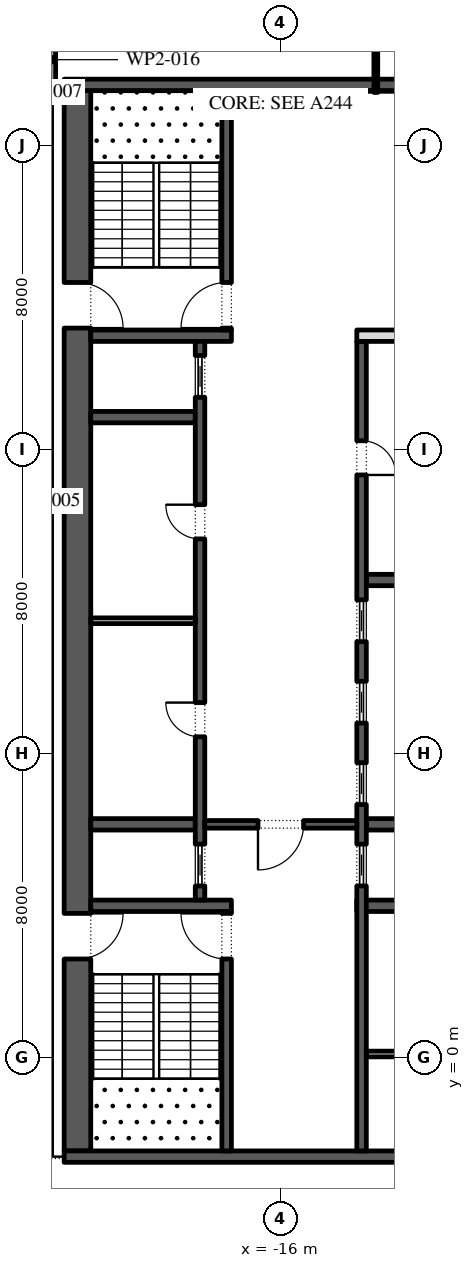
"""IFC4 building model, lengths in metres.
Left out: names, types, materials, properties, quantities, classifications, styles, units other than length and angle.
Written with IfcOpenShell. Run it as: python <this file> out.ifc"""

import sys

from ifc_helpers import new_model, si_unit, direction, frame, frame_2d, origin, place, context, subcontext, project, spatial, rectangle, extrude, element, fill, save


model = new_model("IFC4")
c1 = context("Model", 3, precision=1e-05, world=origin(), true_north=direction((0.0, 1.0)))
c2 = subcontext(c1, "Body", "Model", "MODEL_VIEW")
j1 = project(units=[si_unit("LENGTHUNIT", "METRE"), si_unit("PLANEANGLEUNIT", "RADIAN")], contexts=[c1])
p1 = place(None, origin())
s1 = spatial("IfcSite", under=j1, at=p1, CompositionType="ELEMENT")
p2 = place(p1, origin())
s2 = spatial("IfcBuilding", under=s1, at=p2, CompositionType="ELEMENT")
p3 = place(p2, frame((0.0, 0.0, 188.4)))
s3 = spatial("IfcBuildingStorey", under=s2, at=p3, CompositionType="ELEMENT", Elevation=188.4)
p4 = place(p3, frame((-33.157, 30.092, 0.0), z_axis=(0.0, 0.0, 1.0), x_axis=(0.224950279389, -0.974370243697, 0.0)))
e1 = element("IfcWall", 1, at=p4, inside=s3, PredefinedType="STANDARD", context=c2, shape_type="SweptSolid", body=[
    extrude(rectangle(XDim=49.5, YDim=0.3, at=frame_2d((24.75, 0.0))), origin(), (0.0, 0.0, 1.0), 4.0),
])
p5 = place(p4, frame((2.207, 0.0, 0.0)))
e2 = element("IfcOpeningElement", 2, at=p5, cuts=e1, PredefinedType="OPENING", context=c2, shape_type="SweptSolid", body=[
    extrude(rectangle(XDim=2.4, YDim=3.5, at=frame_2d((1.2, 1.75))), frame((0.0, 0.16, 0.0), z_axis=(0.0, -1.0, 0.0), x_axis=(1.0, 0.0, 0.0)), (0.0, 0.0, 1.0), 0.32),
])
p6 = place(p4, frame((8.121, 0.0, 0.45)))
e3 = element("IfcOpeningElement", 3, at=p6, cuts=e1, PredefinedType="OPENING", context=c2, shape_type="SweptSolid", body=[
    extrude(rectangle(XDim=4.5, YDim=2.825, at=frame_2d((2.25, 1.413))), frame((0.0, 0.16, 0.0), z_axis=(0.0, -1.0, 0.0), x_axis=(1.0, 0.0, 0.0)), (0.0, 0.0, 1.0), 0.32),
])
p7 = place(p4, frame((15.236, 0.0, 0.45)))
e4 = element("IfcOpeningElement", 4, at=p7, cuts=e1, PredefinedType="OPENING", context=c2, shape_type="SweptSolid", body=[
    extrude(rectangle(XDim=4.5, YDim=2.95, at=frame_2d((2.25, 1.475))), frame((0.0, 0.16, 0.0), z_axis=(0.0, -1.0, 0.0), x_axis=(1.0, 0.0, 0.0)), (0.0, 0.0, 1.0), 0.32),
])
p8 = place(p4, frame((22.35, 0.0, 0.45)))
e5 = element("IfcOpeningElement", 5, at=p8, cuts=e1, PredefinedType="OPENING", context=c2, shape_type="SweptSolid", body=[
    extrude(rectangle(XDim=4.5, YDim=3.0, at=frame_2d((2.25, 1.5))), frame((0.0, 0.16, 0.0), z_axis=(0.0, -1.0, 0.0), x_axis=(1.0, 0.0, 0.0)), (0.0, 0.0, 1.0), 0.32),
])
p9 = place(p4, frame((30.514, 0.0, 0.0)))
e6 = element("IfcOpeningElement", 6, at=p9, cuts=e1, PredefinedType="OPENING", context=c2, shape_type="SweptSolid", body=[
    extrude(rectangle(XDim=2.4, YDim=3.5, at=frame_2d((1.2, 1.75))), frame((0.0, 0.16, 0.0), z_axis=(0.0, -1.0, 0.0), x_axis=(1.0, 0.0, 0.0)), (0.0, 0.0, 1.0), 0.32),
])
p10 = place(p4, frame((36.579, 0.0, 0.45)))
e7 = element("IfcOpeningElement", 7, at=p10, cuts=e1, PredefinedType="OPENING", context=c2, shape_type="SweptSolid", body=[
    extrude(rectangle(XDim=4.5, YDim=3.05, at=frame_2d((2.25, 1.525))), frame((0.0, 0.16, 0.0), z_axis=(0.0, -1.0, 0.0), x_axis=(1.0, 0.0, 0.0)), (0.0, 0.0, 1.0), 0.32),
])
p11 = place(p4, frame((43.693, 0.0, 0.45)))
e8 = element("IfcOpeningElement", 8, at=p11, cuts=e1, PredefinedType="OPENING", context=c2, shape_type="SweptSolid", body=[
    extrude(rectangle(XDim=4.5, YDim=3.05, at=frame_2d((2.25, 1.525))), frame((0.0, 0.16, 0.0), z_axis=(0.0, -1.0, 0.0), x_axis=(1.0, 0.0, 0.0)), (0.0, 0.0, 1.0), 0.32),
])
p12 = place(p3, frame((-21.35, -2.45, 0.0), z_axis=(0.0, 0.0, 1.0), x_axis=(0.0, 1.0, 0.0)))
e9 = element("IfcWall", 9, at=p12, inside=s3, PredefinedType="SHEAR", context=c2, shape_type="SweptSolid", body=[
    extrude(rectangle(XDim=27.9, YDim=0.7, at=frame_2d((13.95, 0.0))), origin(), (0.0, 0.0, 1.0), 4.0),
])
p13 = place(p12, frame((5.05, 0.0, 0.0)))
e10 = element("IfcOpeningElement", 10, at=p13, cuts=e9, PredefinedType="OPENING", context=c2, shape_type="SweptSolid", body=[
    extrude(rectangle(XDim=1.2, YDim=2.1, at=frame_2d((0.6, 1.05))), frame((0.0, 0.36, 0.0), z_axis=(0.0, -1.0, 0.0), x_axis=(1.0, 0.0, 0.0)), (0.0, 0.0, 1.0), 0.72),
])
p14 = place(p12, frame((21.65, 0.0, 0.0)))
e11 = element("IfcOpeningElement", 11, at=p14, cuts=e9, PredefinedType="OPENING", context=c2, shape_type="SweptSolid", body=[
    extrude(rectangle(XDim=1.2, YDim=2.1, at=frame_2d((0.6, 1.05))), frame((0.0, 0.36, 0.0), z_axis=(0.0, -1.0, 0.0), x_axis=(1.0, 0.0, 0.0)), (0.0, 0.0, 1.0), 0.72),
])
for number, where, z_axis, x_axis in (
    (12, (-21.7, -2.6, 0.0), (0.0, 0.0, 1.0), (1.0, 0.0, 0.0)),
    (13, (-21.7, 25.6, 0.0), (0.0, 0.0, 1.0), (1.0, 0.0, 0.0)),
):
    element("IfcWall", number, at=place(p3, frame(where, z_axis=z_axis, x_axis=x_axis)), inside=s3, PredefinedType="SHEAR", context=c2, shape_type="SweptSolid", body=[
        extrude(rectangle(XDim=11.4, YDim=0.3, at=frame_2d((5.7, 0.0))), origin(), (0.0, 0.0, 1.0), 4.0),
    ])
p15 = place(p3, frame((-21.0, 4.0, 0.0), z_axis=(0.0, 0.0, 1.0), x_axis=(1.0, 0.0, 0.0)))
e14 = element("IfcWall", 14, at=p15, inside=s3, PredefinedType="SHEAR", context=c2, shape_type="SweptSolid", body=[
    extrude(rectangle(XDim=3.7, YDim=0.3, at=frame_2d((1.85, 0.0))), origin(), (0.0, 0.0, 1.0), 4.0),
])
p16 = place(p3, frame((-17.425, -2.45, 0.0), z_axis=(0.0, 0.0, 1.0), x_axis=(0.0, 1.0, 0.0)))
e15 = element("IfcWall", 15, at=p16, inside=s3, PredefinedType="SHEAR", context=c2, shape_type="SweptSolid", body=[
    extrude(rectangle(XDim=6.3, YDim=0.25, at=frame_2d((3.15, 0.0))), origin(), (0.0, 0.0, 1.0), 4.0),
])
p17 = place(p16, frame((5.05, 0.0, 0.0)))
e16 = element("IfcOpeningElement", 16, at=p17, cuts=e15, PredefinedType="OPENING", context=c2, shape_type="SweptSolid", body=[
    extrude(rectangle(XDim=1.2, YDim=2.1, at=frame_2d((0.6, 1.05))), frame((0.0, 0.135, 0.0), z_axis=(0.0, -1.0, 0.0), x_axis=(1.0, 0.0, 0.0)), (0.0, 0.0, 1.0), 0.27),
])
p18 = place(p3, frame((-21.0, 19.0, 0.0), z_axis=(0.0, 0.0, 1.0), x_axis=(1.0, 0.0, 0.0)))
e17 = element("IfcWall", 17, at=p18, inside=s3, PredefinedType="SHEAR", context=c2, shape_type="SweptSolid", body=[
    extrude(rectangle(XDim=3.7, YDim=0.3, at=frame_2d((1.85, 0.0))), origin(), (0.0, 0.0, 1.0), 4.0),
])
p19 = place(p3, frame((-17.425, 19.15, 0.0), z_axis=(0.0, 0.0, 1.0), x_axis=(0.0, 1.0, 0.0)))
e18 = element("IfcWall", 18, at=p19, inside=s3, PredefinedType="SHEAR", context=c2, shape_type="SweptSolid", body=[
    extrude(rectangle(XDim=6.3, YDim=0.25, at=frame_2d((3.15, 0.0))), origin(), (0.0, 0.0, 1.0), 4.0),
])
p20 = place(p19, frame((0.05, 0.0, 0.0)))
e19 = element("IfcOpeningElement", 19, at=p20, cuts=e18, PredefinedType="OPENING", context=c2, shape_type="SweptSolid", body=[
    extrude(rectangle(XDim=1.2, YDim=2.1, at=frame_2d((0.6, 1.05))), frame((0.0, 0.135, 0.0), z_axis=(0.0, -1.0, 0.0), x_axis=(1.0, 0.0, 0.0)), (0.0, 0.0, 1.0), 0.27),
])
for number, where, z_axis, x_axis in (
    (20, (-21.0, 6.143, 0.0), (0.0, 0.0, 1.0), (1.0, 0.0, 0.0)),
    (21, (-21.0, 16.857, 0.0), (0.0, 0.0, 1.0), (1.0, 0.0, 0.0)),
):
    element("IfcWall", number, at=place(p3, frame(where, z_axis=z_axis, x_axis=x_axis)), inside=s3, PredefinedType="SHEAR", context=c2, shape_type="SweptSolid", body=[
        extrude(rectangle(XDim=2.75, YDim=0.3, at=frame_2d((1.375, 0.0))), origin(), (0.0, 0.0, 1.0), 4.0),
    ])
p21 = place(p3, frame((-18.125, 4.15, 0.0), z_axis=(0.0, 0.0, 1.0), x_axis=(0.0, 1.0, 0.0)))
e22 = element("IfcWall", 22, at=p21, inside=s3, PredefinedType="SHEAR", context=c2, shape_type="SweptSolid", body=[
    extrude(rectangle(XDim=14.7, YDim=0.25, at=frame_2d((7.35, 0.0))), origin(), (0.0, 0.0, 1.0), 4.0),
])
p22 = place(p21, frame((4.296, 0.0, 0.0)))
e23 = element("IfcOpeningElement", 23, at=p22, cuts=e22, PredefinedType="OPENING", context=c2, shape_type="SweptSolid", body=[
    extrude(rectangle(XDim=0.9, YDim=2.1, at=frame_2d((0.45, 1.05))), frame((0.0, 0.135, 0.0), z_axis=(0.0, -1.0, 0.0), x_axis=(1.0, 0.0, 0.0)), (0.0, 0.0, 1.0), 0.27),
])
p23 = place(p21, frame((9.504, 0.0, 0.0)))
e24 = element("IfcOpeningElement", 24, at=p23, cuts=e22, PredefinedType="OPENING", context=c2, shape_type="SweptSolid", body=[
    extrude(rectangle(XDim=0.9, YDim=2.1, at=frame_2d((0.45, 1.05))), frame((0.0, 0.135, 0.0), z_axis=(0.0, -1.0, 0.0), x_axis=(1.0, 0.0, 0.0)), (0.0, 0.0, 1.0), 0.27),
])
p24 = place(p21, frame((0.371, 0.0, 0.0)))
e25 = element("IfcOpeningElement", 25, at=p24, cuts=e22, PredefinedType="OPENING", context=c2, shape_type="SweptSolid", body=[
    extrude(rectangle(XDim=1.1, YDim=2.1, at=frame_2d((0.55, 1.05))), frame((0.0, 0.135, 0.0), z_axis=(0.0, -1.0, 0.0), x_axis=(1.0, 0.0, 0.0)), (0.0, 0.0, 1.0), 0.27),
])
p25 = place(p21, frame((13.229, 0.0, 0.0)))
e26 = element("IfcOpeningElement", 26, at=p25, cuts=e22, PredefinedType="OPENING", context=c2, shape_type="SweptSolid", body=[
    extrude(rectangle(XDim=1.1, YDim=2.1, at=frame_2d((0.55, 1.05))), frame((0.0, 0.135, 0.0), z_axis=(0.0, -1.0, 0.0), x_axis=(1.0, 0.0, 0.0)), (0.0, 0.0, 1.0), 0.27),
])
p26 = place(p3, frame((-21.0, 11.5, 0.0), z_axis=(0.0, 0.0, 1.0), x_axis=(1.0, 0.0, 0.0)))
e27 = element("IfcWall", 27, at=p26, inside=s3, PredefinedType="PARTITIONING", context=c2, shape_type="SweptSolid", body=[
    extrude(rectangle(XDim=2.75, YDim=0.15, at=frame_2d((1.375, 0.0))), origin(), (0.0, 0.0, 1.0), 4.0),
])
p27 = place(p3, frame((-14.0, 4.0, 0.0), z_axis=(0.0, 0.0, 1.0), x_axis=(1.0, 0.0, 0.0)))
e28 = element("IfcWall", 28, at=p27, inside=s3, PredefinedType="SHEAR", context=c2, shape_type="SweptSolid", body=[
    extrude(rectangle(XDim=3.0, YDim=0.3, at=frame_2d((1.5, 0.0))), origin(), (0.0, 0.0, 1.0), 4.0),
])
for number, where, z_axis, x_axis in (
    (29, (-13.75, 6.143, 0.0), (0.0, 0.0, 1.0), (1.0, 0.0, 0.0)),
    (30, (-13.75, 12.571, 0.0), (0.0, 0.0, 1.0), (1.0, 0.0, 0.0)),
):
    element("IfcWall", number, at=place(p3, frame(where, z_axis=z_axis, x_axis=x_axis)), inside=s3, PredefinedType="SHEAR", context=c2, shape_type="SweptSolid", body=[
        extrude(rectangle(XDim=2.75, YDim=0.3, at=frame_2d((1.375, 0.0))), origin(), (0.0, 0.0, 1.0), 4.0),
    ])
p28 = place(p3, frame((-13.875, -2.45, 0.0), z_axis=(0.0, 0.0, 1.0), x_axis=(0.0, 1.0, 0.0)))
e31 = element("IfcWall", 31, at=p28, inside=s3, PredefinedType="SHEAR", context=c2, shape_type="SweptSolid", body=[
    extrude(rectangle(XDim=21.3, YDim=0.25, at=frame_2d((10.65, 0.0))), origin(), (0.0, 0.0, 1.0), 4.0),
])
p29 = place(p28, frame((17.786, 0.0, 0.0)))
e32 = element("IfcOpeningElement", 32, at=p29, cuts=e31, PredefinedType="OPENING", context=c2, shape_type="SweptSolid", body=[
    extrude(rectangle(XDim=0.9, YDim=2.1, at=frame_2d((0.45, 1.05))), frame((0.0, 0.135, 0.0), z_axis=(0.0, -1.0, 0.0), x_axis=(1.0, 0.0, 0.0)), (0.0, 0.0, 1.0), 0.27),
])
p30 = place(p28, frame((6.971, 0.0, 0.0)))
e33 = element("IfcOpeningElement", 33, at=p30, cuts=e31, PredefinedType="OPENING", context=c2, shape_type="SweptSolid", body=[
    extrude(rectangle(XDim=1.1, YDim=2.1, at=frame_2d((0.55, 1.05))), frame((0.0, 0.135, 0.0), z_axis=(0.0, -1.0, 0.0), x_axis=(1.0, 0.0, 0.0)), (0.0, 0.0, 1.0), 0.27),
])
p31 = place(p28, frame((9.114, 0.0, 0.0)))
e34 = element("IfcOpeningElement", 34, at=p31, cuts=e31, PredefinedType="OPENING", context=c2, shape_type="SweptSolid", body=[
    extrude(rectangle(XDim=1.1, YDim=2.1, at=frame_2d((0.55, 1.05))), frame((0.0, 0.135, 0.0), z_axis=(0.0, -1.0, 0.0), x_axis=(1.0, 0.0, 0.0)), (0.0, 0.0, 1.0), 0.27),
])
p32 = place(p28, frame((11.257, 0.0, 0.0)))
e35 = element("IfcOpeningElement", 35, at=p32, cuts=e31, PredefinedType="OPENING", context=c2, shape_type="SweptSolid", body=[
    extrude(rectangle(XDim=1.1, YDim=2.1, at=frame_2d((0.55, 1.05))), frame((0.0, 0.135, 0.0), z_axis=(0.0, -1.0, 0.0), x_axis=(1.0, 0.0, 0.0)), (0.0, 0.0, 1.0), 0.27),
])
p33 = place(p28, frame((13.4, 0.0, 0.0)))
e36 = element("IfcOpeningElement", 36, at=p33, cuts=e31, PredefinedType="OPENING", context=c2, shape_type="SweptSolid", body=[
    extrude(rectangle(XDim=1.1, YDim=2.1, at=frame_2d((0.55, 1.05))), frame((0.0, 0.135, 0.0), z_axis=(0.0, -1.0, 0.0), x_axis=(1.0, 0.0, 0.0)), (0.0, 0.0, 1.0), 0.27),
])
p34 = place(p3, frame((-14.0, 19.0, 0.0), z_axis=(0.0, 0.0, 1.0), x_axis=(1.0, 0.0, 0.0)))
e37 = element("IfcWall", 37, at=p34, inside=s3, PredefinedType="PARTITIONING", context=c2, shape_type="SweptSolid", body=[
    extrude(rectangle(XDim=3.0, YDim=0.3, at=frame_2d((1.5, 0.0))), origin(), (0.0, 0.0, 1.0), 4.0),
])
p35 = place(p3, frame((-18.0, 6.143, 0.0), z_axis=(0.0, 0.0, 1.0), x_axis=(1.0, 0.0, 0.0)))
e38 = element("IfcWall", 38, at=p35, inside=s3, PredefinedType="SHEAR", context=c2, shape_type="SweptSolid", body=[
    extrude(rectangle(XDim=4.0, YDim=0.2, at=frame_2d((2.0, 0.0))), origin(), (0.0, 0.0, 1.0), 4.0),
])
p36 = place(p35, frame((1.4, 0.0, 0.0)))
e39 = element("IfcOpeningElement", 39, at=p36, cuts=e38, PredefinedType="OPENING", context=c2, shape_type="SweptSolid", body=[
    extrude(rectangle(XDim=1.2, YDim=2.1, at=frame_2d((0.6, 1.05))), frame((0.0, 0.11, 0.0), z_axis=(0.0, -1.0, 0.0), x_axis=(1.0, 0.0, 0.0)), (0.0, 0.0, 1.0), 0.22),
])
p37 = place(p3, frame((-13.75, 0.1, 0.0), z_axis=(0.0, 0.0, 1.0), x_axis=(1.0, 0.0, 0.0)))
e40 = element("IfcWall", 40, at=p37, inside=s3, PredefinedType="PARTITIONING", context=c2, shape_type="SweptSolid", body=[
    extrude(rectangle(XDim=2.75, YDim=0.15, at=frame_2d((1.375, 0.0))), origin(), (0.0, 0.0, 1.0), 4.0),
])
p38 = place(p3, frame((-22.0, 27.125, 0.0), z_axis=(0.0, 0.0, 1.0), x_axis=(0.0, -1.0, 0.0)))
e41 = element("IfcWall", 41, at=p38, inside=s3, PredefinedType="PARTITIONING", context=c2, shape_type="SweptSolid", body=[
    extrude(rectangle(XDim=1.725, YDim=0.15, at=frame_2d((0.863, 0.0))), origin(), (0.0, 0.0, 1.0), 4.0),
])
p39 = place(p3, frame((-13.5, 30.37, 0.0), z_axis=(0.0, 0.0, 1.0), x_axis=(0.0, -1.0, 0.0)))
e42 = element("IfcWall", 42, at=p39, inside=s3, PredefinedType="PARTITIONING", context=c2, shape_type="SweptSolid", body=[
    extrude(rectangle(XDim=4.97, YDim=0.1, at=frame_2d((2.485, 0.0))), origin(), (0.0, 0.0, 1.0), 4.0),
])
p40 = place(p22, origin())
e43 = element("IfcDoor", 43, at=p40, inside=s3, OperationType="SINGLE_SWING_LEFT", PredefinedType="DOOR", context=c2, shape_type="SweptSolid", body=[
    extrude(rectangle(XDim=0.9, YDim=2.1, at=frame_2d((0.45, 1.05))), frame((0.0, 0.125, 0.0), z_axis=(0.0, -1.0, 0.0), x_axis=(1.0, 0.0, 0.0)), (0.0, 0.0, 1.0), 0.05),
])
fill(e23, e43)
p41 = place(p23, origin())
e44 = element("IfcDoor", 44, at=p41, inside=s3, OperationType="SINGLE_SWING_LEFT", PredefinedType="DOOR", context=c2, shape_type="SweptSolid", body=[
    extrude(rectangle(XDim=0.9, YDim=2.1, at=frame_2d((0.45, 1.05))), frame((0.0, 0.125, 0.0), z_axis=(0.0, -1.0, 0.0), x_axis=(1.0, 0.0, 0.0)), (0.0, 0.0, 1.0), 0.05),
])
fill(e24, e44)
p42 = place(p24, origin())
e45 = element("IfcDoor", 45, at=p42, inside=s3, OperationType="SLIDING_TO_LEFT", PredefinedType="DOOR", context=c2, shape_type="SweptSolid", body=[
    extrude(rectangle(XDim=1.1, YDim=2.1, at=frame_2d((0.55, 1.05))), frame((0.0, 0.025, 0.0), z_axis=(0.0, -1.0, 0.0), x_axis=(1.0, 0.0, 0.0)), (0.0, 0.0, 1.0), 0.05),
])
fill(e25, e45)
p43 = place(p25, origin())
e46 = element("IfcDoor", 46, at=p43, inside=s3, OperationType="SLIDING_TO_LEFT", PredefinedType="DOOR", context=c2, shape_type="SweptSolid", body=[
    extrude(rectangle(XDim=1.1, YDim=2.1, at=frame_2d((0.55, 1.05))), frame((0.0, 0.025, 0.0), z_axis=(0.0, -1.0, 0.0), x_axis=(1.0, 0.0, 0.0)), (0.0, 0.0, 1.0), 0.05),
])
fill(e26, e46)
p44 = place(p29, frame((0.9, -0.2, 0.0), z_axis=(0.0, 0.0, 1.0), x_axis=(-1.0, 0.0, 0.0)))
e47 = element("IfcDoor", 47, at=p44, inside=s3, OperationType="SINGLE_SWING_LEFT", PredefinedType="DOOR", context=c2, shape_type="SweptSolid", body=[
    extrude(rectangle(XDim=0.9, YDim=2.1, at=frame_2d((0.45, 1.05))), frame((0.0, -0.075, 0.0), z_axis=(0.0, -1.0, 0.0), x_axis=(1.0, 0.0, 0.0)), (0.0, 0.0, 1.0), 0.05),
])
fill(e32, e47)
p45 = place(p30, origin())
e48 = element("IfcDoor", 48, at=p45, inside=s3, OperationType="SLIDING_TO_LEFT", PredefinedType="DOOR", context=c2, shape_type="SweptSolid", body=[
    extrude(rectangle(XDim=1.1, YDim=2.1, at=frame_2d((0.55, 1.05))), frame((0.0, 0.025, 0.0), z_axis=(0.0, -1.0, 0.0), x_axis=(1.0, 0.0, 0.0)), (0.0, 0.0, 1.0), 0.05),
])
fill(e33, e48)
p46 = place(p31, origin())
e49 = element("IfcDoor", 49, at=p46, inside=s3, OperationType="SLIDING_TO_LEFT", PredefinedType="DOOR", context=c2, shape_type="SweptSolid", body=[
    extrude(rectangle(XDim=1.1, YDim=2.1, at=frame_2d((0.55, 1.05))), frame((0.0, 0.025, 0.0), z_axis=(0.0, -1.0, 0.0), x_axis=(1.0, 0.0, 0.0)), (0.0, 0.0, 1.0), 0.05),
])
fill(e34, e49)
p47 = place(p32, origin())
e50 = element("IfcDoor", 50, at=p47, inside=s3, OperationType="SLIDING_TO_LEFT", PredefinedType="DOOR", context=c2, shape_type="SweptSolid", body=[
    extrude(rectangle(XDim=1.1, YDim=2.1, at=frame_2d((0.55, 1.05))), frame((0.0, 0.025, 0.0), z_axis=(0.0, -1.0, 0.0), x_axis=(1.0, 0.0, 0.0)), (0.0, 0.0, 1.0), 0.05),
])
fill(e35, e50)
p48 = place(p33, origin())
e51 = element("IfcDoor", 51, at=p48, inside=s3, OperationType="SLIDING_TO_LEFT", PredefinedType="DOOR", context=c2, shape_type="SweptSolid", body=[
    extrude(rectangle(XDim=1.1, YDim=2.1, at=frame_2d((0.55, 1.05))), frame((0.0, 0.025, 0.0), z_axis=(0.0, -1.0, 0.0), x_axis=(1.0, 0.0, 0.0)), (0.0, 0.0, 1.0), 0.05),
])
fill(e36, e51)
p49 = place(p36, frame((1.2, 0.0, 0.0), z_axis=(0.0, 0.0, 1.0), x_axis=(-1.0, 0.0, 0.0)))
e52 = element("IfcDoor", 52, at=p49, inside=s3, OperationType="SINGLE_SWING_LEFT", PredefinedType="DOOR", context=c2, shape_type="SweptSolid", body=[
    extrude(rectangle(XDim=1.2, YDim=2.1, at=frame_2d((0.6, 1.05))), frame((0.0, 0.025, 0.0), z_axis=(0.0, -1.0, 0.0), x_axis=(1.0, 0.0, 0.0)), (0.0, 0.0, 1.0), 0.05),
])
fill(e39, e52)
p50 = place(p17, origin())
e53 = element("IfcDoor", 53, at=p50, inside=s3, OperationType="SINGLE_SWING_LEFT", PredefinedType="DOOR", context=c2, shape_type="SweptSolid", body=[
    extrude(rectangle(XDim=1.2, YDim=2.1, at=frame_2d((0.6, 1.05))), frame((0.0, 0.025, 0.0), z_axis=(0.0, -1.0, 0.0), x_axis=(1.0, 0.0, 0.0)), (0.0, 0.0, 1.0), 0.05),
])
fill(e16, e53)
p51 = place(p13, frame((1.2, 0.0, 0.0), z_axis=(0.0, 0.0, 1.0), x_axis=(-1.0, 0.0, 0.0)))
e54 = element("IfcDoor", 54, at=p51, inside=s3, OperationType="SINGLE_SWING_RIGHT", PredefinedType="DOOR", context=c2, shape_type="SweptSolid", body=[
    extrude(rectangle(XDim=1.2, YDim=2.1, at=frame_2d((0.6, 1.05))), frame((0.0, 0.025, 0.0), z_axis=(0.0, -1.0, 0.0), x_axis=(1.0, 0.0, 0.0)), (0.0, 0.0, 1.0), 0.05),
])
fill(e10, e54)
p52 = place(p20, origin())
e55 = element("IfcDoor", 55, at=p52, inside=s3, OperationType="SINGLE_SWING_RIGHT", PredefinedType="DOOR", context=c2, shape_type="SweptSolid", body=[
    extrude(rectangle(XDim=1.2, YDim=2.1, at=frame_2d((0.6, 1.05))), frame((0.0, 0.025, 0.0), z_axis=(0.0, -1.0, 0.0), x_axis=(1.0, 0.0, 0.0)), (0.0, 0.0, 1.0), 0.05),
])
fill(e19, e55)
p53 = place(p14, frame((1.2, 0.0, 0.0), z_axis=(0.0, 0.0, 1.0), x_axis=(-1.0, 0.0, 0.0)))
e56 = element("IfcDoor", 56, at=p53, inside=s3, OperationType="SINGLE_SWING_LEFT", PredefinedType="DOOR", context=c2, shape_type="SweptSolid", body=[
    extrude(rectangle(XDim=1.2, YDim=2.1, at=frame_2d((0.6, 1.05))), frame((0.0, 0.025, 0.0), z_axis=(0.0, -1.0, 0.0), x_axis=(1.0, 0.0, 0.0)), (0.0, 0.0, 1.0), 0.05),
])
fill(e11, e56)
save(model, sys.argv[1])
